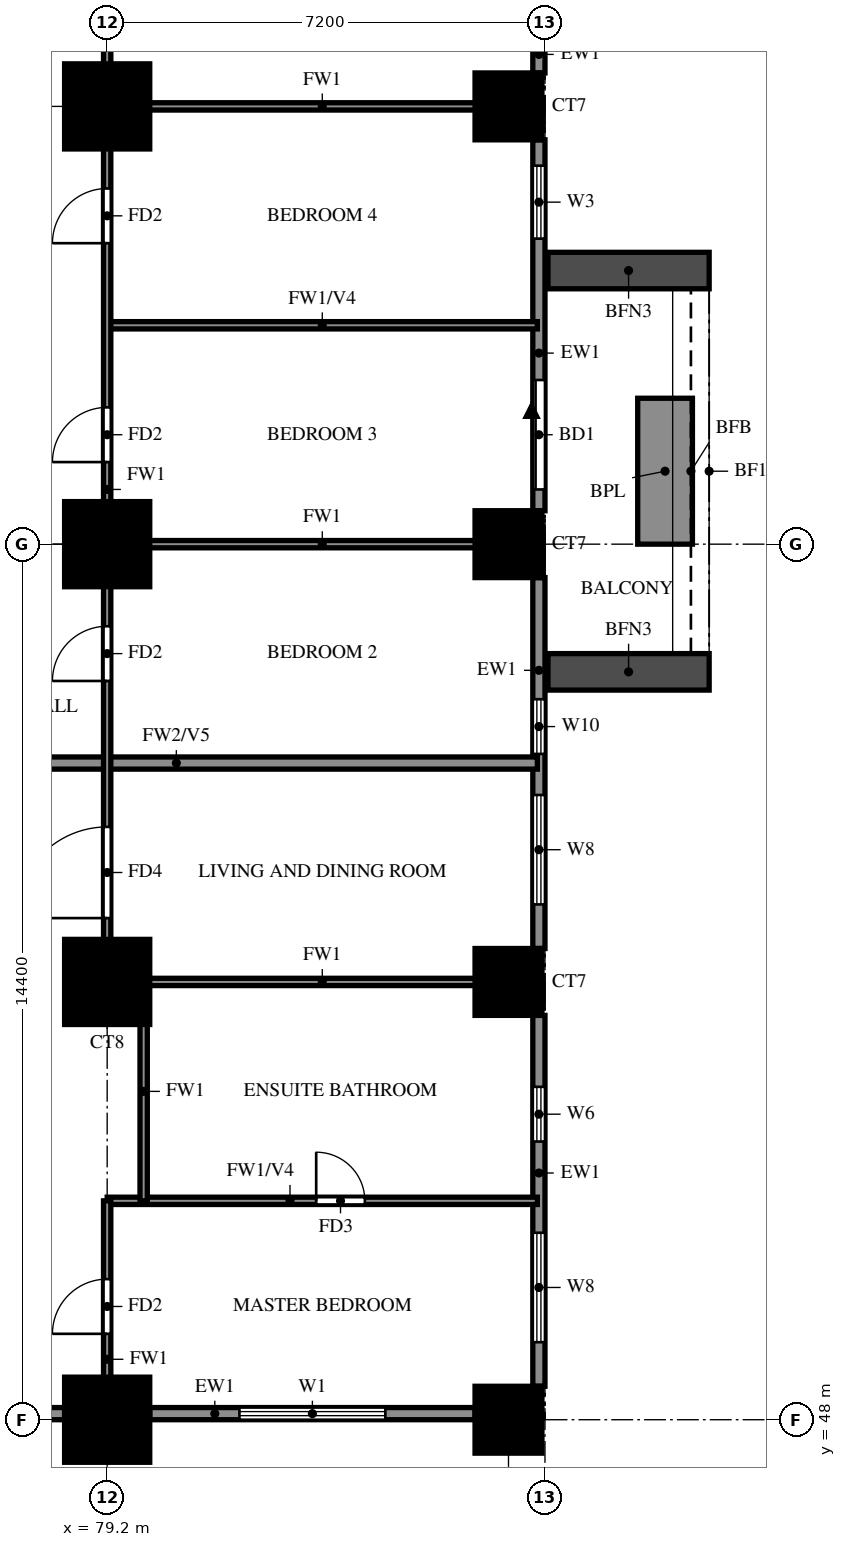
"""IFC4 building model, lengths in metres.
Left out: names, types, materials, properties, quantities, classifications, styles, units other than length and angle.
Written with IfcOpenShell. Run it as: python <this file> out.ifc"""

import sys

from ifc_helpers import new_model, si_unit, direction, frame, frame_2d, origin, origin_2d, place, context, subcontext, project, spatial, rectangle, extrude, source, transform, mapped, element, fill, save


model = new_model("IFC4")
c1 = context("Model", 3, precision=1e-05, world=origin(), true_north=direction((0.0, 1.0)))
c2 = subcontext(c1, "Body", "Model", "MODEL_VIEW")
j1 = project(units=[si_unit("LENGTHUNIT", "METRE"), si_unit("PLANEANGLEUNIT", "RADIAN")], contexts=[c1])
p1 = place(None, origin())
s1 = spatial("IfcSite", under=j1, at=p1, CompositionType="ELEMENT")
p2 = place(p1, origin())
s2 = spatial("IfcBuilding", under=s1, at=p2, CompositionType="ELEMENT")
p3 = place(p2, frame((0.0, 0.0, 37.5)))
s3 = spatial("IfcBuildingStorey", under=s2, at=p3, CompositionType="ELEMENT", Elevation=37.5)
m1 = source(origin(), c2, "Body", "SweptSolid", [
    extrude(rectangle(XDim=1.4, YDim=1.4, at=origin_2d()), origin(), (0.0, 0.0, 1.0), 3.18),
])
p4 = place(p3, frame((79.2, 48.0, 0.0), z_axis=(0.0, 0.0, 1.0), x_axis=(1.0, 0.0, 0.0)))
e1 = element("IfcColumn", 1, at=p4, inside=s3, PredefinedType="COLUMN", context=c2, shape_type="MappedRepresentation", body=[
    mapped(m1, transform((0.0, 0.0, 0.0))),
])
m2 = source(origin(), c2, "Body", "SweptSolid", [
    extrude(rectangle(XDim=1.1, YDim=1.1, at=origin_2d()), origin(), (0.0, 0.0, 1.0), 3.18),
])
p5 = place(p3, frame((85.8, 48.0, 0.0), z_axis=(0.0, 0.0, 1.0), x_axis=(1.0, 0.0, 0.0)))
e2 = element("IfcColumn", 2, at=p5, inside=s3, PredefinedType="COLUMN", context=c2, shape_type="MappedRepresentation", body=[
    mapped(m2, transform((0.0, 0.0, 0.0))),
])
p6 = place(p3, frame((79.2, 55.2, 0.0), z_axis=(0.0, 0.0, 1.0), x_axis=(1.0, 0.0, 0.0)))
e3 = element("IfcColumn", 3, at=p6, inside=s3, PredefinedType="COLUMN", context=c2, shape_type="MappedRepresentation", body=[
    mapped(m1, transform((0.0, 0.0, 0.0))),
])
p7 = place(p3, frame((85.8, 55.2, 0.0), z_axis=(0.0, 0.0, 1.0), x_axis=(1.0, 0.0, 0.0)))
e4 = element("IfcColumn", 4, at=p7, inside=s3, PredefinedType="COLUMN", context=c2, shape_type="MappedRepresentation", body=[
    mapped(m2, transform((0.0, 0.0, 0.0))),
])
p8 = place(p3, frame((79.2, 62.4, 0.0), z_axis=(0.0, 0.0, 1.0), x_axis=(1.0, 0.0, 0.0)))
e5 = element("IfcColumn", 5, at=p8, inside=s3, PredefinedType="COLUMN", context=c2, shape_type="MappedRepresentation", body=[
    mapped(m1, transform((0.0, 0.0, 0.0))),
])
p9 = place(p3, frame((85.8, 62.4, 0.0), z_axis=(0.0, 0.0, 1.0), x_axis=(1.0, 0.0, 0.0)))
e6 = element("IfcColumn", 6, at=p9, inside=s3, PredefinedType="COLUMN", context=c2, shape_type="MappedRepresentation", body=[
    mapped(m2, transform((0.0, 0.0, 0.0))),
])
p10 = place(p3, frame((79.2, 69.6, 0.0), z_axis=(0.0, 0.0, 1.0), x_axis=(1.0, 0.0, 0.0)))
e7 = element("IfcColumn", 7, at=p10, inside=s3, PredefinedType="COLUMN", context=c2, shape_type="MappedRepresentation", body=[
    mapped(m1, transform((0.0, 0.0, 0.0))),
])
p11 = place(p3, frame((85.8, 69.6, 0.0), z_axis=(0.0, 0.0, 1.0), x_axis=(1.0, 0.0, 0.0)))
e8 = element("IfcColumn", 8, at=p11, inside=s3, PredefinedType="COLUMN", context=c2, shape_type="MappedRepresentation", body=[
    mapped(m2, transform((0.0, 0.0, 0.0))),
])
p12 = place(p3, frame((78.74, 41.118, 0.0), z_axis=(0.0, 0.0, 1.0), x_axis=(-0.707106781187, 0.707106781187, 0.0)))
e9 = element("IfcWall", 9, at=p12, inside=s3, PredefinedType="SOLIDWALL", context=c2, shape_type="SweptSolid", body=[
    extrude(rectangle(XDim=9.874, YDim=0.2, at=frame_2d((4.937, 0.0))), origin(), (0.0, 0.0, 1.0), 3.18),
])
p13 = place(p3, frame((71.989, 48.1, 0.0), z_axis=(0.0, 0.0, 1.0), x_axis=(1.0, 0.0, 0.0)))
e10 = element("IfcWall", 10, at=p13, inside=s3, PredefinedType="SOLIDWALL", context=c2, shape_type="SweptSolid", body=[
    extrude(rectangle(XDim=6.511, YDim=0.2, at=frame_2d((3.256, 0.0))), origin(), (0.0, 0.0, 1.0), 3.18),
])
p14 = place(p13, frame((2.206, 0.0, 1.5)))
e11 = element("IfcOpeningElement", 11, at=p14, cuts=e10, PredefinedType="OPENING", context=c2, shape_type="SweptSolid", body=[
    extrude(rectangle(XDim=0.9, YDim=0.9, at=frame_2d((0.45, 0.45))), frame((0.0, 0.11, 0.0), z_axis=(0.0, -1.0, 0.0), x_axis=(1.0, 0.0, 0.0)), (0.0, 0.0, 1.0), 0.22),
])
p15 = place(p3, frame((79.9, 48.1, 0.0), z_axis=(0.0, 0.0, 1.0), x_axis=(1.0, 0.0, 0.0)))
e12 = element("IfcWall", 12, at=p15, inside=s3, PredefinedType="SOLIDWALL", context=c2, shape_type="SweptSolid", body=[
    extrude(rectangle(XDim=5.35, YDim=0.2, at=frame_2d((2.675, 0.0))), origin(), (0.0, 0.0, 1.0), 3.18),
])
p16 = place(p15, frame((1.475, 0.0, 0.6)))
e13 = element("IfcOpeningElement", 13, at=p16, cuts=e12, PredefinedType="OPENING", context=c2, shape_type="SweptSolid", body=[
    extrude(rectangle(XDim=2.4, YDim=2.4, at=frame_2d((1.2, 1.2))), frame((0.0, 0.11, 0.0), z_axis=(0.0, -1.0, 0.0), x_axis=(1.0, 0.0, 0.0)), (0.0, 0.0, 1.0), 0.22),
])
p17 = place(p3, frame((86.3, 48.55, 0.0), z_axis=(0.0, 0.0, 1.0), x_axis=(0.0, 1.0, 0.0)))
e14 = element("IfcWall", 14, at=p17, inside=s3, PredefinedType="SOLIDWALL", context=c2, shape_type="SweptSolid", body=[
    extrude(rectangle(XDim=6.1, YDim=0.2, at=frame_2d((3.05, 0.0))), origin(), (0.0, 0.0, 1.0), 3.18),
])
p18 = place(p17, frame((0.725, 0.0, 0.6)))
e15 = element("IfcOpeningElement", 15, at=p18, cuts=e14, PredefinedType="OPENING", context=c2, shape_type="SweptSolid", body=[
    extrude(rectangle(XDim=1.8, YDim=2.4, at=frame_2d((0.9, 1.2))), frame((0.0, 0.11, 0.0), z_axis=(0.0, -1.0, 0.0), x_axis=(1.0, 0.0, 0.0)), (0.0, 0.0, 1.0), 0.22),
])
p19 = place(p17, frame((4.025, 0.0, 1.5)))
e16 = element("IfcOpeningElement", 16, at=p19, cuts=e14, PredefinedType="OPENING", context=c2, shape_type="SweptSolid", body=[
    extrude(rectangle(XDim=0.9, YDim=0.9, at=frame_2d((0.45, 0.45))), frame((0.0, 0.11, 0.0), z_axis=(0.0, -1.0, 0.0), x_axis=(1.0, 0.0, 0.0)), (0.0, 0.0, 1.0), 0.22),
])
p20 = place(p3, frame((86.3, 55.75, 0.0), z_axis=(0.0, 0.0, 1.0), x_axis=(0.0, 1.0, 0.0)))
e17 = element("IfcWall", 17, at=p20, inside=s3, PredefinedType="SOLIDWALL", context=c2, shape_type="SweptSolid", body=[
    extrude(rectangle(XDim=6.1, YDim=0.2, at=frame_2d((3.05, 0.0))), origin(), (0.0, 0.0, 1.0), 3.18),
])
p21 = place(p20, frame((0.725, 0.0, 0.6)))
e18 = element("IfcOpeningElement", 18, at=p21, cuts=e17, PredefinedType="OPENING", context=c2, shape_type="SweptSolid", body=[
    extrude(rectangle(XDim=1.8, YDim=2.4, at=frame_2d((0.9, 1.2))), frame((0.0, 0.11, 0.0), z_axis=(0.0, -1.0, 0.0), x_axis=(1.0, 0.0, 0.0)), (0.0, 0.0, 1.0), 0.22),
])
p22 = place(p20, frame((3.2, 0.0, 0.6)))
e19 = element("IfcOpeningElement", 19, at=p22, cuts=e17, PredefinedType="OPENING", context=c2, shape_type="SweptSolid", body=[
    extrude(rectangle(XDim=0.9, YDim=2.4, at=frame_2d((0.45, 1.2))), frame((0.0, 0.11, 0.0), z_axis=(0.0, -1.0, 0.0), x_axis=(1.0, 0.0, 0.0)), (0.0, 0.0, 1.0), 0.22),
])
p23 = place(p3, frame((86.3, 62.95, 0.0), z_axis=(0.0, 0.0, 1.0), x_axis=(0.0, 1.0, 0.0)))
e20 = element("IfcWall", 20, at=p23, inside=s3, PredefinedType="SOLIDWALL", context=c2, shape_type="SweptSolid", body=[
    extrude(rectangle(XDim=6.1, YDim=0.2, at=frame_2d((3.05, 0.0))), origin(), (0.0, 0.0, 1.0), 3.18),
])
p24 = place(p23, frame((0.35, 0.0, 0.0)))
e21 = element("IfcOpeningElement", 21, at=p24, cuts=e20, PredefinedType="OPENING", context=c2, shape_type="SweptSolid", body=[
    extrude(rectangle(XDim=1.8, YDim=2.4, at=frame_2d((0.9, 1.2))), frame((0.0, 0.11, 0.0), z_axis=(0.0, -1.0, 0.0), x_axis=(1.0, 0.0, 0.0)), (0.0, 0.0, 1.0), 0.22),
])
p25 = place(p23, frame((4.475, 0.0, 0.6)))
e22 = element("IfcOpeningElement", 22, at=p25, cuts=e20, PredefinedType="OPENING", context=c2, shape_type="SweptSolid", body=[
    extrude(rectangle(XDim=1.2, YDim=2.4, at=frame_2d((0.6, 1.2))), frame((0.0, 0.11, 0.0), z_axis=(0.0, -1.0, 0.0), x_axis=(1.0, 0.0, 0.0)), (0.0, 0.0, 1.0), 0.22),
])
p26 = place(p3, frame((86.3, 70.15, 0.0), z_axis=(0.0, 0.0, 1.0), x_axis=(0.0, 1.0, 0.0)))
e23 = element("IfcWall", 23, at=p26, inside=s3, PredefinedType="SOLIDWALL", context=c2, shape_type="SweptSolid", body=[
    extrude(rectangle(XDim=6.1, YDim=0.2, at=frame_2d((3.05, 0.0))), origin(), (0.0, 0.0, 1.0), 3.18),
])
p27 = place(p26, frame((0.725, 0.0, 0.6)))
e24 = element("IfcOpeningElement", 24, at=p27, cuts=e23, PredefinedType="OPENING", context=c2, shape_type="SweptSolid", body=[
    extrude(rectangle(XDim=1.8, YDim=2.4, at=frame_2d((0.9, 1.2))), frame((0.0, 0.11, 0.0), z_axis=(0.0, -1.0, 0.0), x_axis=(1.0, 0.0, 0.0)), (0.0, 0.0, 1.0), 0.22),
])
p28 = place(p26, frame((3.575, 0.0, 0.6)))
e25 = element("IfcOpeningElement", 25, at=p28, cuts=e23, PredefinedType="OPENING", context=c2, shape_type="SweptSolid", body=[
    extrude(rectangle(XDim=1.8, YDim=2.4, at=frame_2d((0.9, 1.2))), frame((0.0, 0.11, 0.0), z_axis=(0.0, -1.0, 0.0), x_axis=(1.0, 0.0, 0.0)), (0.0, 0.0, 1.0), 0.22),
])
for number, where, z_axis, x_axis in (
    (26, (86.45, 60.3, 0.0), (0.0, 0.0, 1.0), (1.0, 0.0, 0.0)),
    (27, (86.45, 66.9, 0.0), (0.0, 0.0, 1.0), (1.0, 0.0, 0.0)),
):
    element("IfcWall", number, at=place(p3, frame(where, z_axis=z_axis, x_axis=x_axis)), inside=s3, PredefinedType="SOLIDWALL", context=c2, shape_type="SweptSolid", body=[
        extrude(rectangle(XDim=2.65, YDim=0.6, at=frame_2d((1.325, 0.0))), origin(), (0.0, 0.0, 1.0), 2.85),
    ])
p29 = place(p3, frame((88.375, 62.4, 0.0), z_axis=(0.0, 0.0, 1.0), x_axis=(0.0, 1.0, 0.0)))
e28 = element("IfcWall", 28, at=p29, inside=s3, PredefinedType="SOLIDWALL", context=c2, shape_type="SweptSolid", body=[
    extrude(rectangle(XDim=2.4, YDim=0.9, at=frame_2d((1.2, 0.0))), origin(), (0.0, 0.0, 1.0), 0.9),
])
p30 = place(p3, frame((74.4, 58.8, 0.0), z_axis=(0.0, 0.0, 1.0), x_axis=(1.0, 0.0, 0.0)))
e29 = element("IfcWall", 29, at=p30, inside=s3, PredefinedType="SOLIDWALL", context=c2, shape_type="SweptSolid", body=[
    extrude(rectangle(XDim=11.875, YDim=0.2, at=frame_2d((5.938, 0.0))), origin(), (0.0, 0.0, 1.0), 2.28),
])
p31 = place(p3, frame((79.2, 51.6, 0.0), z_axis=(0.0, 0.0, 1.0), x_axis=(1.0, 0.0, 0.0)))
e30 = element("IfcWall", 30, at=p31, inside=s3, PredefinedType="PARTITIONING", context=c2, shape_type="SweptSolid", body=[
    extrude(rectangle(XDim=7.075, YDim=0.12, at=frame_2d((3.538, 0.0))), origin(), (0.0, 0.0, 1.0), 2.28),
])
p32 = place(p31, frame((3.438, 0.0, 0.0)))
e31 = element("IfcOpeningElement", 31, at=p32, cuts=e30, PredefinedType="OPENING", context=c2, shape_type="SweptSolid", body=[
    extrude(rectangle(XDim=0.8, YDim=2.1, at=frame_2d((0.4, 1.05))), frame((0.0, 0.07, 0.0), z_axis=(0.0, -1.0, 0.0), x_axis=(1.0, 0.0, 0.0)), (0.0, 0.0, 1.0), 0.14),
])
for number, where, z_axis, x_axis in (
    (32, (79.2, 55.2, 0.0), (0.0, 0.0, 1.0), (1.0, 0.0, 0.0)),
    (33, (79.2, 62.4, 0.0), (0.0, 0.0, 1.0), (1.0, 0.0, 0.0)),
):
    element("IfcWall", number, at=place(p3, frame(where, z_axis=z_axis, x_axis=x_axis)), inside=s3, PredefinedType="PARTITIONING", context=c2, shape_type="SweptSolid", body=[
        extrude(rectangle(XDim=7.075, YDim=0.12, at=frame_2d((3.538, 0.0))), origin(), (0.0, 0.0, 1.0), 3.18),
    ])
p33 = place(p3, frame((79.2, 66.0, 0.0), z_axis=(0.0, 0.0, 1.0), x_axis=(1.0, 0.0, 0.0)))
e34 = element("IfcWall", 34, at=p33, inside=s3, PredefinedType="PARTITIONING", context=c2, shape_type="SweptSolid", body=[
    extrude(rectangle(XDim=7.075, YDim=0.12, at=frame_2d((3.538, 0.0))), origin(), (0.0, 0.0, 1.0), 2.28),
])
p34 = place(p3, frame((79.2, 69.6, 0.0), z_axis=(0.0, 0.0, 1.0), x_axis=(1.0, 0.0, 0.0)))
e35 = element("IfcWall", 35, at=p34, inside=s3, PredefinedType="PARTITIONING", context=c2, shape_type="SweptSolid", body=[
    extrude(rectangle(XDim=7.075, YDim=0.12, at=frame_2d((3.538, 0.0))), origin(), (0.0, 0.0, 1.0), 3.18),
])
p35 = place(p3, frame((79.2, 48.125, 0.0), z_axis=(0.0, 0.0, 1.0), x_axis=(0.0, 1.0, 0.0)))
e36 = element("IfcWall", 36, at=p35, inside=s3, PredefinedType="PARTITIONING", context=c2, shape_type="SweptSolid", body=[
    extrude(rectangle(XDim=3.475, YDim=0.12, at=frame_2d((1.738, 0.0))), origin(), (0.0, 0.0, 1.0), 3.18),
])
p36 = place(p35, frame((1.288, 0.0, 0.0)))
e37 = element("IfcOpeningElement", 37, at=p36, cuts=e36, PredefinedType="OPENING", context=c2, shape_type="SweptSolid", body=[
    extrude(rectangle(XDim=0.9, YDim=2.1, at=frame_2d((0.45, 1.05))), frame((0.0, 0.07, 0.0), z_axis=(0.0, -1.0, 0.0), x_axis=(1.0, 0.0, 0.0)), (0.0, 0.0, 1.0), 0.14),
])
p37 = place(p3, frame((79.2, 55.2, 0.0), z_axis=(0.0, 0.0, 1.0), x_axis=(0.0, 1.0, 0.0)))
e38 = element("IfcWall", 38, at=p37, inside=s3, PredefinedType="PARTITIONING", context=c2, shape_type="SweptSolid", body=[
    extrude(rectangle(XDim=18.0, YDim=0.12, at=frame_2d((9.0, 0.0))), origin(), (0.0, 0.0, 1.0), 3.18),
])
p38 = place(p37, frame((1.05, 0.0, 0.0)))
e39 = element("IfcOpeningElement", 39, at=p38, cuts=e38, PredefinedType="OPENING", context=c2, shape_type="SweptSolid", body=[
    extrude(rectangle(XDim=1.5, YDim=2.1, at=frame_2d((0.75, 1.05))), frame((0.0, 0.07, 0.0), z_axis=(0.0, -1.0, 0.0), x_axis=(1.0, 0.0, 0.0)), (0.0, 0.0, 1.0), 0.14),
])
p39 = place(p37, frame((4.95, 0.0, 0.0)))
e40 = element("IfcOpeningElement", 40, at=p39, cuts=e38, PredefinedType="OPENING", context=c2, shape_type="SweptSolid", body=[
    extrude(rectangle(XDim=0.9, YDim=2.1, at=frame_2d((0.45, 1.05))), frame((0.0, 0.07, 0.0), z_axis=(0.0, -1.0, 0.0), x_axis=(1.0, 0.0, 0.0)), (0.0, 0.0, 1.0), 0.14),
])
p40 = place(p37, frame((8.55, 0.0, 0.0)))
e41 = element("IfcOpeningElement", 41, at=p40, cuts=e38, PredefinedType="OPENING", context=c2, shape_type="SweptSolid", body=[
    extrude(rectangle(XDim=0.9, YDim=2.1, at=frame_2d((0.45, 1.05))), frame((0.0, 0.07, 0.0), z_axis=(0.0, -1.0, 0.0), x_axis=(1.0, 0.0, 0.0)), (0.0, 0.0, 1.0), 0.14),
])
p41 = place(p37, frame((12.15, 0.0, 0.0)))
e42 = element("IfcOpeningElement", 42, at=p41, cuts=e38, PredefinedType="OPENING", context=c2, shape_type="SweptSolid", body=[
    extrude(rectangle(XDim=0.9, YDim=2.1, at=frame_2d((0.45, 1.05))), frame((0.0, 0.07, 0.0), z_axis=(0.0, -1.0, 0.0), x_axis=(1.0, 0.0, 0.0)), (0.0, 0.0, 1.0), 0.14),
])
p42 = place(p37, frame((15.75, 0.0, 0.0)))
e43 = element("IfcOpeningElement", 43, at=p42, cuts=e38, PredefinedType="OPENING", context=c2, shape_type="SweptSolid", body=[
    extrude(rectangle(XDim=0.9, YDim=2.1, at=frame_2d((0.45, 1.05))), frame((0.0, 0.07, 0.0), z_axis=(0.0, -1.0, 0.0), x_axis=(1.0, 0.0, 0.0)), (0.0, 0.0, 1.0), 0.14),
])
p43 = place(p3, frame((79.8, 51.6, 0.0), z_axis=(0.0, 0.0, 1.0), x_axis=(0.0, 1.0, 0.0)))
e44 = element("IfcWall", 44, at=p43, inside=s3, PredefinedType="PARTITIONING", context=c2, shape_type="SweptSolid", body=[
    extrude(rectangle(XDim=3.6, YDim=0.12, at=frame_2d((1.8, 0.0))), origin(), (0.0, 0.0, 1.0), 3.18),
])
p44 = place(p16, origin())
e45 = element("IfcWindow", 45, at=p44, inside=s3, PartitioningType="DOUBLE_PANEL_VERTICAL", PredefinedType="WINDOW", context=c2, shape_type="SweptSolid", body=[
    extrude(rectangle(XDim=2.4, YDim=2.4, at=frame_2d((1.2, 1.2))), frame((0.0, 0.03, 0.0), z_axis=(0.0, -1.0, 0.0), x_axis=(1.0, 0.0, 0.0)), (0.0, 0.0, 1.0), 0.06),
])
fill(e13, e45)
p45 = place(p18, origin())
e46 = element("IfcWindow", 46, at=p45, inside=s3, PartitioningType="DOUBLE_PANEL_VERTICAL", PredefinedType="WINDOW", context=c2, shape_type="SweptSolid", body=[
    extrude(rectangle(XDim=1.8, YDim=2.4, at=frame_2d((0.9, 1.2))), frame((0.0, 0.03, 0.0), z_axis=(0.0, -1.0, 0.0), x_axis=(1.0, 0.0, 0.0)), (0.0, 0.0, 1.0), 0.06),
])
fill(e15, e46)
p46 = place(p19, origin())
e47 = element("IfcWindow", 47, at=p46, inside=s3, PartitioningType="SINGLE_PANEL", PredefinedType="WINDOW", context=c2, shape_type="SweptSolid", body=[
    extrude(rectangle(XDim=0.9, YDim=0.9, at=frame_2d((0.45, 0.45))), frame((0.0, 0.03, 0.0), z_axis=(0.0, -1.0, 0.0), x_axis=(1.0, 0.0, 0.0)), (0.0, 0.0, 1.0), 0.06),
])
fill(e16, e47)
p47 = place(p21, origin())
e48 = element("IfcWindow", 48, at=p47, inside=s3, PartitioningType="DOUBLE_PANEL_VERTICAL", PredefinedType="WINDOW", context=c2, shape_type="SweptSolid", body=[
    extrude(rectangle(XDim=1.8, YDim=2.4, at=frame_2d((0.9, 1.2))), frame((0.0, 0.03, 0.0), z_axis=(0.0, -1.0, 0.0), x_axis=(1.0, 0.0, 0.0)), (0.0, 0.0, 1.0), 0.06),
])
fill(e18, e48)
p48 = place(p22, origin())
e49 = element("IfcWindow", 49, at=p48, inside=s3, PartitioningType="SINGLE_PANEL", PredefinedType="WINDOW", context=c2, shape_type="SweptSolid", body=[
    extrude(rectangle(XDim=0.9, YDim=2.4, at=frame_2d((0.45, 1.2))), frame((0.0, 0.03, 0.0), z_axis=(0.0, -1.0, 0.0), x_axis=(1.0, 0.0, 0.0)), (0.0, 0.0, 1.0), 0.06),
])
fill(e19, e49)
p49 = place(p24, origin())
e50 = element("IfcDoor", 50, at=p49, inside=s3, OperationType="DOUBLE_DOOR_SLIDING", PredefinedType="DOOR", context=c2, shape_type="SweptSolid", body=[
    extrude(rectangle(XDim=1.8, YDim=2.4, at=frame_2d((0.9, 1.2))), frame((0.0, 0.025, 0.0), z_axis=(0.0, -1.0, 0.0), x_axis=(1.0, 0.0, 0.0)), (0.0, 0.0, 1.0), 0.05),
])
fill(e21, e50)
p50 = place(p25, origin())
e51 = element("IfcWindow", 51, at=p50, inside=s3, PartitioningType="SINGLE_PANEL", PredefinedType="WINDOW", context=c2, shape_type="SweptSolid", body=[
    extrude(rectangle(XDim=1.2, YDim=2.4, at=frame_2d((0.6, 1.2))), frame((0.0, 0.03, 0.0), z_axis=(0.0, -1.0, 0.0), x_axis=(1.0, 0.0, 0.0)), (0.0, 0.0, 1.0), 0.06),
])
fill(e22, e51)
p51 = place(p36, origin())
e52 = element("IfcDoor", 52, at=p51, inside=s3, OperationType="SINGLE_SWING_LEFT", PredefinedType="DOOR", context=c2, shape_type="SweptSolid", body=[
    extrude(rectangle(XDim=0.9, YDim=2.1, at=frame_2d((0.45, 1.05))), frame((0.0, 0.025, 0.0), z_axis=(0.0, -1.0, 0.0), x_axis=(1.0, 0.0, 0.0)), (0.0, 0.0, 1.0), 0.05),
])
fill(e37, e52)
p52 = place(p32, origin())
e53 = element("IfcDoor", 53, at=p52, inside=s3, OperationType="SINGLE_SWING_RIGHT", PredefinedType="DOOR", context=c2, shape_type="SweptSolid", body=[
    extrude(rectangle(XDim=0.8, YDim=2.1, at=frame_2d((0.4, 1.05))), frame((0.0, 0.025, 0.0), z_axis=(0.0, -1.0, 0.0), x_axis=(1.0, 0.0, 0.0)), (0.0, 0.0, 1.0), 0.05),
])
fill(e31, e53)
p53 = place(p38, origin())
e54 = element("IfcDoor", 54, at=p53, inside=s3, OperationType="SINGLE_SWING_LEFT", PredefinedType="DOOR", context=c2, shape_type="SweptSolid", body=[
    extrude(rectangle(XDim=1.5, YDim=2.1, at=frame_2d((0.75, 1.05))), frame((0.0, 0.025, 0.0), z_axis=(0.0, -1.0, 0.0), x_axis=(1.0, 0.0, 0.0)), (0.0, 0.0, 1.0), 0.05),
])
fill(e39, e54)
p54 = place(p39, origin())
e55 = element("IfcDoor", 55, at=p54, inside=s3, OperationType="SINGLE_SWING_LEFT", PredefinedType="DOOR", context=c2, shape_type="SweptSolid", body=[
    extrude(rectangle(XDim=0.9, YDim=2.1, at=frame_2d((0.45, 1.05))), frame((0.0, 0.025, 0.0), z_axis=(0.0, -1.0, 0.0), x_axis=(1.0, 0.0, 0.0)), (0.0, 0.0, 1.0), 0.05),
])
fill(e40, e55)
p55 = place(p40, origin())
e56 = element("IfcDoor", 56, at=p55, inside=s3, OperationType="SINGLE_SWING_LEFT", PredefinedType="DOOR", context=c2, shape_type="SweptSolid", body=[
    extrude(rectangle(XDim=0.9, YDim=2.1, at=frame_2d((0.45, 1.05))), frame((0.0, 0.025, 0.0), z_axis=(0.0, -1.0, 0.0), x_axis=(1.0, 0.0, 0.0)), (0.0, 0.0, 1.0), 0.05),
])
fill(e41, e56)
p56 = place(p41, origin())
e57 = element("IfcDoor", 57, at=p56, inside=s3, OperationType="SINGLE_SWING_RIGHT", PredefinedType="DOOR", context=c2, shape_type="SweptSolid", body=[
    extrude(rectangle(XDim=0.9, YDim=2.1, at=frame_2d((0.45, 1.05))), frame((0.0, 0.025, 0.0), z_axis=(0.0, -1.0, 0.0), x_axis=(1.0, 0.0, 0.0)), (0.0, 0.0, 1.0), 0.05),
])
fill(e42, e57)
save(model, sys.argv[1])
